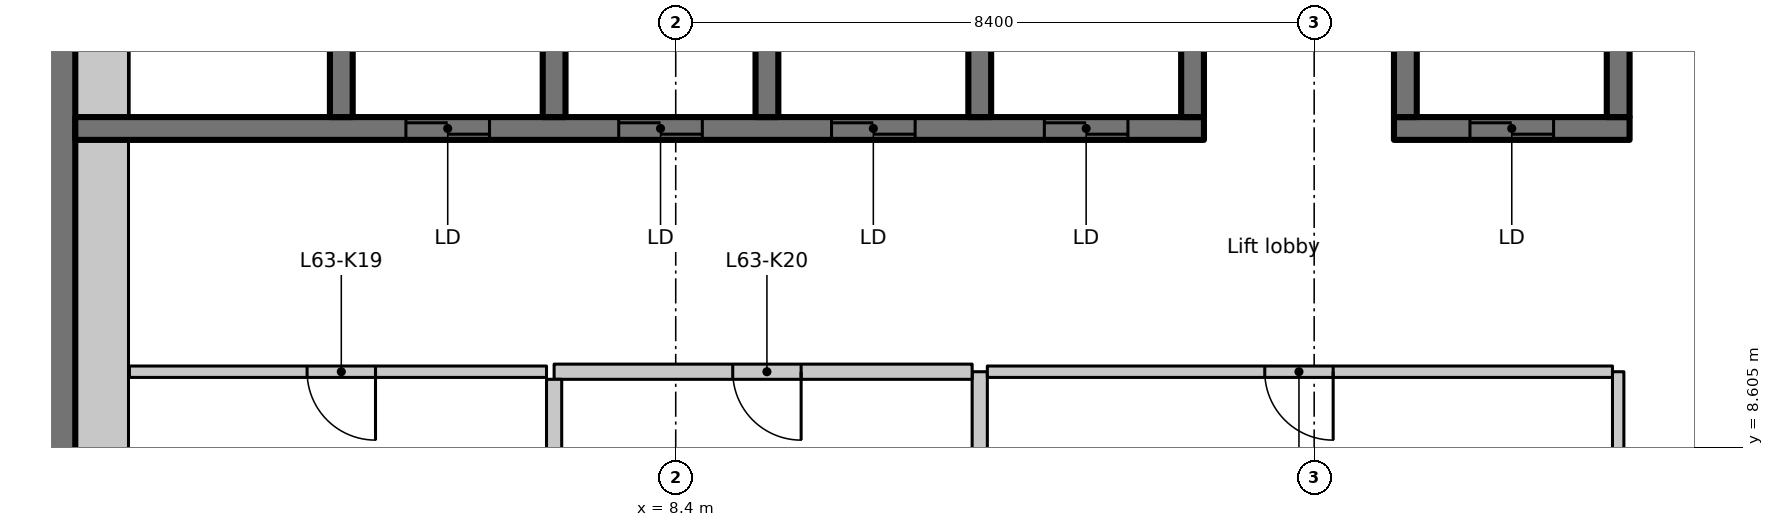
"""IFC4 building model, lengths in metres.
Left out: names, types, materials, properties, quantities, classifications, styles, units other than length and angle.
Written with IfcOpenShell. Run it as: python <this file> out.ifc"""

import sys

from ifc_helpers import new_model, si_unit, direction, frame, frame_2d, origin, place, context, subcontext, project, spatial, rectangle, extrude, element, fill, save


model = new_model("IFC4")
c1 = context("Model", 3, precision=1e-05, world=origin(), true_north=direction((0.0, 1.0)))
c2 = subcontext(c1, "Body", "Model", "MODEL_VIEW")
j1 = project(units=[si_unit("LENGTHUNIT", "METRE"), si_unit("PLANEANGLEUNIT", "RADIAN")], contexts=[c1])
p1 = place(None, origin())
s1 = spatial("IfcSite", under=j1, at=p1, CompositionType="ELEMENT")
p2 = place(p1, origin())
s2 = spatial("IfcBuilding", under=s1, at=p2, CompositionType="ELEMENT")
p3 = place(p2, frame((0.0, 0.0, 248.1)))
s3 = spatial("IfcBuildingStorey", under=s2, at=p3, CompositionType="ELEMENT", Elevation=248.1)
p4 = place(p3, frame((0.25, 7.436, 0.0), z_axis=(0.0, 0.0, 1.0), x_axis=(0.0, 1.0, 0.0)))
e1 = element("IfcWall", 1, at=p4, inside=s3, PredefinedType="SHEAR", context=c2, shape_type="SweptSolid", body=[
    extrude(rectangle(XDim=8.864, YDim=0.5, at=frame_2d((4.432, 0.0))), origin(), (0.0, 0.0, 1.0), 3.35),
])
p5 = place(p3, frame((0.5, 12.8, 0.0), z_axis=(0.0, 0.0, 1.0), x_axis=(1.0, 0.0, 0.0)))
e2 = element("IfcWall", 2, at=p5, inside=s3, PredefinedType="SHEAR", context=c2, shape_type="SweptSolid", body=[
    extrude(rectangle(XDim=14.85, YDim=0.3, at=frame_2d((7.425, 0.0))), origin(), (0.0, 0.0, 1.0), 3.35),
])
p6 = place(p5, frame((4.35, 0.0, 0.0)))
e3 = element("IfcOpeningElement", 3, at=p6, cuts=e2, PredefinedType="OPENING", context=c2, shape_type="SweptSolid", body=[
    extrude(rectangle(XDim=1.1, YDim=2.3, at=frame_2d((0.55, 1.15))), frame((0.0, 0.16, 0.0), z_axis=(0.0, -1.0, 0.0), x_axis=(1.0, 0.0, 0.0)), (0.0, 0.0, 1.0), 0.32),
])
p7 = place(p5, frame((7.15, 0.0, 0.0)))
e4 = element("IfcOpeningElement", 4, at=p7, cuts=e2, PredefinedType="OPENING", context=c2, shape_type="SweptSolid", body=[
    extrude(rectangle(XDim=1.1, YDim=2.3, at=frame_2d((0.55, 1.15))), frame((0.0, 0.16, 0.0), z_axis=(0.0, -1.0, 0.0), x_axis=(1.0, 0.0, 0.0)), (0.0, 0.0, 1.0), 0.32),
])
p8 = place(p5, frame((9.95, 0.0, 0.0)))
e5 = element("IfcOpeningElement", 5, at=p8, cuts=e2, PredefinedType="OPENING", context=c2, shape_type="SweptSolid", body=[
    extrude(rectangle(XDim=1.1, YDim=2.3, at=frame_2d((0.55, 1.15))), frame((0.0, 0.16, 0.0), z_axis=(0.0, -1.0, 0.0), x_axis=(1.0, 0.0, 0.0)), (0.0, 0.0, 1.0), 0.32),
])
p9 = place(p5, frame((12.75, 0.0, 0.0)))
e6 = element("IfcOpeningElement", 6, at=p9, cuts=e2, PredefinedType="OPENING", context=c2, shape_type="SweptSolid", body=[
    extrude(rectangle(XDim=1.1, YDim=2.3, at=frame_2d((0.55, 1.15))), frame((0.0, 0.16, 0.0), z_axis=(0.0, -1.0, 0.0), x_axis=(1.0, 0.0, 0.0)), (0.0, 0.0, 1.0), 0.32),
])
for number, where, z_axis, x_axis in (
    (7, (4.0, 12.95, 0.0), (0.0, 0.0, 1.0), (0.0, 1.0, 0.0)),
    (8, (6.8, 12.95, 0.0), (0.0, 0.0, 1.0), (0.0, 1.0, 0.0)),
    (9, (9.6, 12.95, 0.0), (0.0, 0.0, 1.0), (0.0, 1.0, 0.0)),
    (10, (12.4, 12.95, 0.0), (0.0, 0.0, 1.0), (0.0, 1.0, 0.0)),
    (11, (15.2, 12.95, 0.0), (0.0, 0.0, 1.0), (0.0, 1.0, 0.0)),
):
    element("IfcWall", number, at=place(p3, frame(where, z_axis=z_axis, x_axis=x_axis)), inside=s3, PredefinedType="SHEAR", context=c2, shape_type="SweptSolid", body=[
        extrude(rectangle(XDim=3.35, YDim=0.3, at=frame_2d((1.675, 0.0))), origin(), (0.0, 0.0, 1.0), 3.35),
    ])
p10 = place(p3, frame((17.85, 12.8, 0.0), z_axis=(0.0, 0.0, 1.0), x_axis=(1.0, 0.0, 0.0)))
e12 = element("IfcWall", 12, at=p10, inside=s3, PredefinedType="SHEAR", context=c2, shape_type="SweptSolid", body=[
    extrude(rectangle(XDim=3.1, YDim=0.3, at=frame_2d((1.55, 0.0))), origin(), (0.0, 0.0, 1.0), 3.35),
])
p11 = place(p10, frame((1.0, 0.0, 0.0)))
e13 = element("IfcOpeningElement", 13, at=p11, cuts=e12, PredefinedType="OPENING", context=c2, shape_type="SweptSolid", body=[
    extrude(rectangle(XDim=1.1, YDim=2.3, at=frame_2d((0.55, 1.15))), frame((0.0, 0.16, 0.0), z_axis=(0.0, -1.0, 0.0), x_axis=(1.0, 0.0, 0.0)), (0.0, 0.0, 1.0), 0.32),
])
for number, where, z_axis, x_axis in (
    (14, (18.0, 12.95, 0.0), (0.0, 0.0, 1.0), (0.0, 1.0, 0.0)),
    (15, (20.8, 12.95, 0.0), (0.0, 0.0, 1.0), (0.0, 1.0, 0.0)),
):
    element("IfcWall", number, at=place(p3, frame(where, z_axis=z_axis, x_axis=x_axis)), inside=s3, PredefinedType="SHEAR", context=c2, shape_type="SweptSolid", body=[
        extrude(rectangle(XDim=3.35, YDim=0.3, at=frame_2d((1.675, 0.0))), origin(), (0.0, 0.0, 1.0), 3.35),
    ])
p12 = place(p3, frame((12.4, 7.1, 0.0), z_axis=(0.0, 0.0, 1.0), x_axis=(0.0, 1.0, 0.0)))
e16 = element("IfcWall", 16, at=p12, inside=s3, PredefinedType="PARTITIONING", context=c2, shape_type="SweptSolid", body=[
    extrude(rectangle(XDim=2.5, YDim=0.2, at=frame_2d((1.25, 0.0))), origin(), (0.0, 0.0, 1.0), 3.35),
])
p13 = place(p3, frame((12.3, 9.6, 0.0), z_axis=(0.0, 0.0, 1.0), x_axis=(-1.0, 0.0, 0.0)))
e17 = element("IfcWall", 17, at=p13, inside=s3, PredefinedType="PARTITIONING", context=c2, shape_type="SweptSolid", body=[
    extrude(rectangle(XDim=5.5, YDim=0.2, at=frame_2d((2.75, 0.0))), origin(), (0.0, 0.0, 1.0), 3.35),
])
p14 = place(p13, frame((2.25, 0.0, 0.0)))
e18 = element("IfcOpeningElement", 18, at=p14, cuts=e17, PredefinedType="OPENING", context=c2, shape_type="SweptSolid", body=[
    extrude(rectangle(XDim=0.9, YDim=2.1, at=frame_2d((0.45, 1.05))), frame((0.0, 0.11, 0.0), z_axis=(0.0, -1.0, 0.0), x_axis=(1.0, 0.0, 0.0)), (0.0, 0.0, 1.0), 0.22),
])
p15 = place(p3, frame((6.8, 9.5, 0.0), z_axis=(0.0, 0.0, 1.0), x_axis=(0.0, -1.0, 0.0)))
e19 = element("IfcWall", 19, at=p15, inside=s3, PredefinedType="PARTITIONING", context=c2, shape_type="SweptSolid", body=[
    extrude(rectangle(XDim=2.4, YDim=0.2, at=frame_2d((1.2, 0.0))), origin(), (0.0, 0.0, 1.0), 3.35),
])
p16 = place(p3, frame((6.7, 9.6, 0.0), z_axis=(0.0, 0.0, 1.0), x_axis=(-1.0, 0.0, 0.0)))
e20 = element("IfcWall", 20, at=p16, inside=s3, PredefinedType="PARTITIONING", context=c2, shape_type="SweptSolid", body=[
    extrude(rectangle(XDim=5.488, YDim=0.15, at=frame_2d((2.744, 0.0))), origin(), (0.0, 0.0, 1.0), 3.35),
])
p17 = place(p16, frame((2.25, 0.0, 0.0)))
e21 = element("IfcOpeningElement", 21, at=p17, cuts=e20, PredefinedType="OPENING", context=c2, shape_type="SweptSolid", body=[
    extrude(rectangle(XDim=0.9, YDim=2.1, at=frame_2d((0.45, 1.05))), frame((0.0, 0.085, 0.0), z_axis=(0.0, -1.0, 0.0), x_axis=(1.0, 0.0, 0.0)), (0.0, 0.0, 1.0), 0.17),
])
p18 = place(p3, frame((20.8, 7.075, 0.0), z_axis=(0.0, 0.0, 1.0), x_axis=(0.0, 1.0, 0.0)))
e22 = element("IfcWall", 22, at=p18, inside=s3, PredefinedType="PARTITIONING", context=c2, shape_type="SweptSolid", body=[
    extrude(rectangle(XDim=2.525, YDim=0.15, at=frame_2d((1.263, 0.0))), origin(), (0.0, 0.0, 1.0), 3.35),
])
p19 = place(p3, frame((20.725, 9.6, 0.0), z_axis=(0.0, 0.0, 1.0), x_axis=(-1.0, 0.0, 0.0)))
e23 = element("IfcWall", 23, at=p19, inside=s3, PredefinedType="PARTITIONING", context=c2, shape_type="SweptSolid", body=[
    extrude(rectangle(XDim=8.225, YDim=0.15, at=frame_2d((4.113, 0.0))), origin(), (0.0, 0.0, 1.0), 3.35),
])
p20 = place(p19, frame((3.675, 0.0, 0.0)))
e24 = element("IfcOpeningElement", 24, at=p20, cuts=e23, PredefinedType="OPENING", context=c2, shape_type="SweptSolid", body=[
    extrude(rectangle(XDim=0.9, YDim=2.1, at=frame_2d((0.45, 1.05))), frame((0.0, 0.085, 0.0), z_axis=(0.0, -1.0, 0.0), x_axis=(1.0, 0.0, 0.0)), (0.0, 0.0, 1.0), 0.17),
])
p21 = place(p3, frame((0.85, 7.436, 0.0), z_axis=(0.0, 0.0, 1.0), x_axis=(0.0, 1.0, 0.0)))
e25 = element("IfcWall", 25, at=p21, inside=s3, PredefinedType="PARTITIONING", context=c2, shape_type="SweptSolid", body=[
    extrude(rectangle(XDim=5.214, YDim=0.7, at=frame_2d((2.607, 0.0))), origin(), (0.0, 0.0, 1.0), 3.35),
])
p22 = place(p3, frame((0.85, 12.95, 0.0), z_axis=(0.0, 0.0, 1.0), x_axis=(0.0, 1.0, 0.0)))
e26 = element("IfcWall", 26, at=p22, inside=s3, PredefinedType="PARTITIONING", context=c2, shape_type="SweptSolid", body=[
    extrude(rectangle(XDim=2.65, YDim=0.7, at=frame_2d((1.325, 0.0))), origin(), (0.0, 0.0, 1.0), 3.35),
])
p23 = place(p6, origin())
e27 = element("IfcDoor", 27, at=p23, inside=s3, OperationType="SLIDING_TO_LEFT", PredefinedType="DOOR", context=c2, shape_type="SweptSolid", body=[
    extrude(rectangle(XDim=1.1, YDim=2.3, at=frame_2d((0.55, 1.15))), frame((0.0, 0.025, 0.0), z_axis=(0.0, -1.0, 0.0), x_axis=(1.0, 0.0, 0.0)), (0.0, 0.0, 1.0), 0.05),
])
fill(e3, e27)
p24 = place(p7, origin())
e28 = element("IfcDoor", 28, at=p24, inside=s3, OperationType="SLIDING_TO_LEFT", PredefinedType="DOOR", context=c2, shape_type="SweptSolid", body=[
    extrude(rectangle(XDim=1.1, YDim=2.3, at=frame_2d((0.55, 1.15))), frame((0.0, 0.025, 0.0), z_axis=(0.0, -1.0, 0.0), x_axis=(1.0, 0.0, 0.0)), (0.0, 0.0, 1.0), 0.05),
])
fill(e4, e28)
p25 = place(p8, origin())
e29 = element("IfcDoor", 29, at=p25, inside=s3, OperationType="SLIDING_TO_LEFT", PredefinedType="DOOR", context=c2, shape_type="SweptSolid", body=[
    extrude(rectangle(XDim=1.1, YDim=2.3, at=frame_2d((0.55, 1.15))), frame((0.0, 0.025, 0.0), z_axis=(0.0, -1.0, 0.0), x_axis=(1.0, 0.0, 0.0)), (0.0, 0.0, 1.0), 0.05),
])
fill(e5, e29)
p26 = place(p9, origin())
e30 = element("IfcDoor", 30, at=p26, inside=s3, OperationType="SLIDING_TO_LEFT", PredefinedType="DOOR", context=c2, shape_type="SweptSolid", body=[
    extrude(rectangle(XDim=1.1, YDim=2.3, at=frame_2d((0.55, 1.15))), frame((0.0, 0.025, 0.0), z_axis=(0.0, -1.0, 0.0), x_axis=(1.0, 0.0, 0.0)), (0.0, 0.0, 1.0), 0.05),
])
fill(e6, e30)
p27 = place(p11, origin())
e31 = element("IfcDoor", 31, at=p27, inside=s3, OperationType="SLIDING_TO_LEFT", PredefinedType="DOOR", context=c2, shape_type="SweptSolid", body=[
    extrude(rectangle(XDim=1.1, YDim=2.3, at=frame_2d((0.55, 1.15))), frame((0.0, 0.025, 0.0), z_axis=(0.0, -1.0, 0.0), x_axis=(1.0, 0.0, 0.0)), (0.0, 0.0, 1.0), 0.05),
])
fill(e13, e31)
p28 = place(p17, origin())
e32 = element("IfcDoor", 32, at=p28, inside=s3, OperationType="SINGLE_SWING_RIGHT", PredefinedType="DOOR", context=c2, shape_type="SweptSolid", body=[
    extrude(rectangle(XDim=0.9, YDim=2.1, at=frame_2d((0.45, 1.05))), frame((0.0, 0.025, 0.0), z_axis=(0.0, -1.0, 0.0), x_axis=(1.0, 0.0, 0.0)), (0.0, 0.0, 1.0), 0.05),
])
fill(e21, e32)
p29 = place(p14, origin())
e33 = element("IfcDoor", 33, at=p29, inside=s3, OperationType="SINGLE_SWING_LEFT", PredefinedType="DOOR", context=c2, shape_type="SweptSolid", body=[
    extrude(rectangle(XDim=0.9, YDim=2.1, at=frame_2d((0.45, 1.05))), frame((0.0, 0.025, 0.0), z_axis=(0.0, -1.0, 0.0), x_axis=(1.0, 0.0, 0.0)), (0.0, 0.0, 1.0), 0.05),
])
fill(e18, e33)
p30 = place(p20, origin())
e34 = element("IfcDoor", 34, at=p30, inside=s3, OperationType="SINGLE_SWING_RIGHT", PredefinedType="DOOR", context=c2, shape_type="SweptSolid", body=[
    extrude(rectangle(XDim=0.9, YDim=2.1, at=frame_2d((0.45, 1.05))), frame((0.0, 0.025, 0.0), z_axis=(0.0, -1.0, 0.0), x_axis=(1.0, 0.0, 0.0)), (0.0, 0.0, 1.0), 0.05),
])
fill(e24, e34)
save(model, sys.argv[1])
